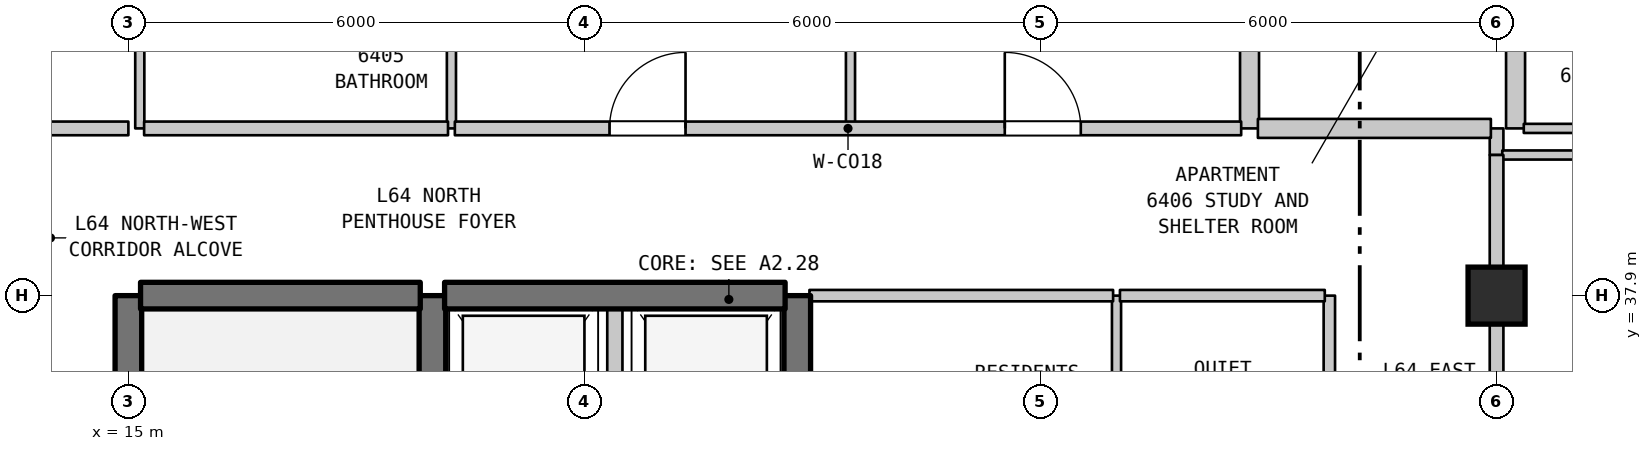
"""IFC4 building model, lengths in metres.
Left out: names, types, materials, properties, quantities, classifications, styles, units other than length and angle.
Written with IfcOpenShell. Run it as: python <this file> out.ifc"""

import sys

from ifc_helpers import new_model, si_unit, direction, frame, frame_2d, origin, origin_2d, place, context, subcontext, project, spatial, rectangle, extrude, element, fill, save


model = new_model("IFC4")
c1 = context("Model", 3, precision=1e-05, world=origin(), true_north=direction((0.0, 1.0)))
c2 = subcontext(c1, "Body", "Model", "MODEL_VIEW")
j1 = project(units=[si_unit("LENGTHUNIT", "METRE"), si_unit("PLANEANGLEUNIT", "RADIAN")], contexts=[c1])
p1 = place(None, origin())
s1 = spatial("IfcSite", under=j1, at=p1, CompositionType="ELEMENT")
p2 = place(p1, origin())
s2 = spatial("IfcBuilding", under=s1, at=p2, CompositionType="ELEMENT")
p3 = place(p2, frame((0.0, 0.0, 258.4)))
s3 = spatial("IfcBuildingStorey", under=s2, at=p3, CompositionType="ELEMENT", Elevation=258.4)
p4 = place(p3, frame((33.0, 37.9, 0.0), z_axis=(0.0, 0.0, 1.0), x_axis=(1.0, 0.0, 0.0)))
e1 = element("IfcColumn", 1, at=p4, inside=s3, PredefinedType="COLUMN", context=c2, shape_type="SweptSolid", body=[
    extrude(rectangle(XDim=0.75, YDim=0.75, at=origin_2d()), origin(), (0.0, 0.0, 1.0), 3.7),
])
p5 = place(p3, frame((15.0, 31.1, 0.0), z_axis=(0.0, 0.0, 1.0), x_axis=(0.0, 1.0, 0.0)))
e2 = element("IfcWall", 2, at=p5, inside=s3, PredefinedType="SHEAR", context=c2, shape_type="SweptSolid", body=[
    extrude(rectangle(XDim=6.8, YDim=0.35, at=frame_2d((3.4, 0.0))), origin(), (0.0, 0.0, 1.0), 3.39),
])
p6 = place(p3, frame((15.15, 40.1, 0.0), z_axis=(0.0, 0.0, 1.0), x_axis=(0.0, 1.0, 0.0)))
e3 = element("IfcWall", 3, at=p6, inside=s3, PredefinedType="PARTITIONING", context=c2, shape_type="SweptSolid", body=[
    extrude(rectangle(XDim=2.3, YDim=0.12, at=frame_2d((1.15, 0.0))), origin(), (0.0, 0.0, 1.0), 3.39),
])
p7 = place(p3, frame((19.0, 35.0, 0.0), z_axis=(0.0, 0.0, 1.0), x_axis=(0.0, 1.0, 0.0)))
e4 = element("IfcWall", 4, at=p7, inside=s3, PredefinedType="SHEAR", context=c2, shape_type="SweptSolid", body=[
    extrude(rectangle(XDim=2.9, YDim=0.35, at=frame_2d((1.45, 0.0))), origin(), (0.0, 0.0, 1.0), 3.39),
])
p8 = place(p3, frame((19.25, 40.1, 0.0), z_axis=(0.0, 0.0, 1.0), x_axis=(0.0, 1.0, 0.0)))
e5 = element("IfcWall", 5, at=p8, inside=s3, PredefinedType="PARTITIONING", context=c2, shape_type="SweptSolid", body=[
    extrude(rectangle(XDim=2.3, YDim=0.12, at=frame_2d((1.15, 0.0))), origin(), (0.0, 0.0, 1.0), 3.39),
])
p9 = place(p3, frame((21.4, 35.0, 0.0), z_axis=(0.0, 0.0, 1.0), x_axis=(0.0, 1.0, 0.0)))
e6 = element("IfcWall", 6, at=p9, inside=s3, PredefinedType="STANDARD", context=c2, shape_type="SweptSolid", body=[
    extrude(rectangle(XDim=2.9, YDim=0.2, at=frame_2d((1.45, 0.0))), origin(), (0.0, 0.0, 1.0), 3.39),
])
p10 = place(p3, frame((23.8, 35.0, 0.0), z_axis=(0.0, 0.0, 1.0), x_axis=(0.0, 1.0, 0.0)))
e7 = element("IfcWall", 7, at=p10, inside=s3, PredefinedType="SHEAR", context=c2, shape_type="SweptSolid", body=[
    extrude(rectangle(XDim=2.9, YDim=0.35, at=frame_2d((1.45, 0.0))), origin(), (0.0, 0.0, 1.0), 3.39),
])
p11 = place(p3, frame((24.5, 40.1, 0.0), z_axis=(0.0, 0.0, 1.0), x_axis=(0.0, 1.0, 0.0)))
e8 = element("IfcWall", 8, at=p11, inside=s3, PredefinedType="PARTITIONING", context=c2, shape_type="SweptSolid", body=[
    extrude(rectangle(XDim=2.05, YDim=0.12, at=frame_2d((1.025, 0.0))), origin(), (0.0, 0.0, 1.0), 3.39),
])
p12 = place(p3, frame((28.0, 35.0, 0.0), z_axis=(0.0, 0.0, 1.0), x_axis=(0.0, 1.0, 0.0)))
e9 = element("IfcWall", 9, at=p12, inside=s3, PredefinedType="PARTITIONING", context=c2, shape_type="SweptSolid", body=[
    extrude(rectangle(XDim=2.9, YDim=0.12, at=frame_2d((1.45, 0.0))), origin(), (0.0, 0.0, 1.0), 3.39),
])
p13 = place(p3, frame((29.75, 40.1, 0.0), z_axis=(0.0, 0.0, 1.0), x_axis=(0.0, 1.0, 0.0)))
e10 = element("IfcWall", 10, at=p13, inside=s3, PredefinedType="STANDARD", context=c2, shape_type="SweptSolid", body=[
    extrude(rectangle(XDim=2.3, YDim=0.25, at=frame_2d((1.15, 0.0))), origin(), (0.0, 0.0, 1.0), 3.39),
])
p14 = place(p3, frame((30.8, 35.0, 0.0), z_axis=(0.0, 0.0, 1.0), x_axis=(0.0, 1.0, 0.0)))
e11 = element("IfcWall", 11, at=p14, inside=s3, PredefinedType="STANDARD", context=c2, shape_type="SweptSolid", body=[
    extrude(rectangle(XDim=2.9, YDim=0.15, at=frame_2d((1.45, 0.0))), origin(), (0.0, 0.0, 1.0), 3.39),
])
p15 = place(p3, frame((33.0, 36.366, 0.0), z_axis=(0.0, 0.0, 1.0), x_axis=(0.0, 1.0, 0.0)))
e12 = element("IfcWall", 12, at=p15, inside=s3, PredefinedType="STANDARD", context=c2, shape_type="SweptSolid", body=[
    extrude(rectangle(XDim=1.534, YDim=0.18, at=frame_2d((0.767, 0.0))), origin(), (0.0, 0.0, 1.0), 2.89),
])
p16 = place(p3, frame((33.0, 39.75, 0.0), z_axis=(0.0, 0.0, 1.0), x_axis=(0.0, 1.0, 0.0)))
e13 = element("IfcWall", 13, at=p16, inside=s3, PredefinedType="STANDARD", context=c2, shape_type="SweptSolid", body=[
    extrude(rectangle(XDim=0.35, YDim=0.18, at=frame_2d((0.175, 0.0))), origin(), (0.0, 0.0, 1.0), 3.39),
])
p17 = place(p3, frame((33.25, 40.1, 0.0), z_axis=(0.0, 0.0, 1.0), x_axis=(0.0, 1.0, 0.0)))
e14 = element("IfcWall", 14, at=p17, inside=s3, PredefinedType="STANDARD", context=c2, shape_type="SweptSolid", body=[
    extrude(rectangle(XDim=2.3, YDim=0.25, at=frame_2d((1.15, 0.0))), origin(), (0.0, 0.0, 1.0), 3.39),
])
p18 = place(p3, frame((15.16, 37.9, 0.0), z_axis=(0.0, 0.0, 1.0), x_axis=(1.0, 0.0, 0.0)))
e15 = element("IfcWall", 15, at=p18, inside=s3, PredefinedType="SHEAR", context=c2, shape_type="SweptSolid", body=[
    extrude(rectangle(XDim=3.68, YDim=0.35, at=frame_2d((1.84, 0.0))), origin(), (0.0, 0.0, 1.0), 3.39),
])
p19 = place(p3, frame((19.16, 37.9, 0.0), z_axis=(0.0, 0.0, 1.0), x_axis=(1.0, 0.0, 0.0)))
e16 = element("IfcWall", 16, at=p19, inside=s3, PredefinedType="SHEAR", context=c2, shape_type="SweptSolid", body=[
    extrude(rectangle(XDim=4.48, YDim=0.35, at=frame_2d((2.24, 0.0))), origin(), (0.0, 0.0, 1.0), 3.39),
])
p20 = place(p3, frame((23.96, 37.9, 0.0), z_axis=(0.0, 0.0, 1.0), x_axis=(1.0, 0.0, 0.0)))
e17 = element("IfcWall", 17, at=p20, inside=s3, PredefinedType="STANDARD", context=c2, shape_type="SweptSolid", body=[
    extrude(rectangle(XDim=3.995, YDim=0.15, at=frame_2d((1.998, 0.0))), origin(), (0.0, 0.0, 1.0), 2.89),
])
p21 = place(p3, frame((28.045, 37.9, 0.0), z_axis=(0.0, 0.0, 1.0), x_axis=(1.0, 0.0, 0.0)))
e18 = element("IfcWall", 18, at=p21, inside=s3, PredefinedType="STANDARD", context=c2, shape_type="SweptSolid", body=[
    extrude(rectangle(XDim=2.695, YDim=0.15, at=frame_2d((1.348, 0.0))), origin(), (0.0, 0.0, 1.0), 2.89),
])
p22 = place(p3, frame((33.075, 39.75, 0.0), z_axis=(0.0, 0.0, 1.0), x_axis=(1.0, 0.0, 0.0)))
e19 = element("IfcWall", 19, at=p22, inside=s3, PredefinedType="PARTITIONING", context=c2, shape_type="SweptSolid", body=[
    extrude(rectangle(XDim=4.46, YDim=0.12, at=frame_2d((2.23, 0.0))), origin(), (0.0, 0.0, 1.0), 3.39),
])
p23 = place(p3, frame((12.975, 40.1, 0.0), z_axis=(0.0, 0.0, 1.0), x_axis=(1.0, 0.0, 0.0)))
e20 = element("IfcWall", 20, at=p23, inside=s3, PredefinedType="STANDARD", context=c2, shape_type="SweptSolid", body=[
    extrude(rectangle(XDim=2.025, YDim=0.18, at=frame_2d((1.012, 0.0))), origin(), (0.0, 0.0, 1.0), 3.39),
])
p24 = place(p3, frame((15.207, 40.1, 0.0), z_axis=(0.0, 0.0, 1.0), x_axis=(1.0, 0.0, 0.0)))
e21 = element("IfcWall", 21, at=p24, inside=s3, PredefinedType="STANDARD", context=c2, shape_type="SweptSolid", body=[
    extrude(rectangle(XDim=3.998, YDim=0.18, at=frame_2d((1.999, 0.0))), origin(), (0.0, 0.0, 1.0), 3.39),
])
p25 = place(p3, frame((19.295, 40.1, 0.0), z_axis=(0.0, 0.0, 1.0), x_axis=(1.0, 0.0, 0.0)))
e22 = element("IfcWall", 22, at=p25, inside=s3, PredefinedType="STANDARD", context=c2, shape_type="SweptSolid", body=[
    extrude(rectangle(XDim=10.345, YDim=0.18, at=frame_2d((5.172, 0.0))), origin(), (0.0, 0.0, 1.0), 3.39),
])
p26 = place(p25, frame((2.035, 0.0, 0.0)))
e23 = element("IfcOpeningElement", 23, at=p26, cuts=e22, PredefinedType="OPENING", context=c2, shape_type="SweptSolid", body=[
    extrude(rectangle(XDim=1.0, YDim=2.15, at=frame_2d((0.5, 1.075))), frame((0.0, 0.1, 0.0), z_axis=(0.0, -1.0, 0.0), x_axis=(1.0, 0.0, 0.0)), (0.0, 0.0, 1.0), 0.2),
])
p27 = place(p25, frame((7.235, 0.0, 0.0)))
e24 = element("IfcOpeningElement", 24, at=p27, cuts=e22, PredefinedType="OPENING", context=c2, shape_type="SweptSolid", body=[
    extrude(rectangle(XDim=1.0, YDim=2.15, at=frame_2d((0.5, 1.075))), frame((0.0, 0.1, 0.0), z_axis=(0.0, -1.0, 0.0), x_axis=(1.0, 0.0, 0.0)), (0.0, 0.0, 1.0), 0.2),
])
p28 = place(p3, frame((29.86, 40.1, 0.0), z_axis=(0.0, 0.0, 1.0), x_axis=(1.0, 0.0, 0.0)))
e25 = element("IfcWall", 25, at=p28, inside=s3, PredefinedType="STANDARD", context=c2, shape_type="SweptSolid", body=[
    extrude(rectangle(XDim=3.065, YDim=0.25, at=frame_2d((1.532, 0.0))), origin(), (0.0, 0.0, 1.0), 3.39),
])
p29 = place(p3, frame((33.358, 40.1, 0.0), z_axis=(0.0, 0.0, 1.0), x_axis=(1.0, 0.0, 0.0)))
e26 = element("IfcWall", 26, at=p29, inside=s3, PredefinedType="PARTITIONING", context=c2, shape_type="SweptSolid", body=[
    extrude(rectangle(XDim=2.925, YDim=0.12, at=frame_2d((1.462, 0.0))), origin(), (0.0, 0.0, 1.0), 3.39),
])
p30 = place(p3, frame((33.0, 37.9, 0.0), z_axis=(0.0, 0.0, 1.0), x_axis=(0.0, 1.0, 0.0)))
e27 = element("IfcWall", 27, at=p30, inside=s3, PredefinedType="STANDARD", context=c2, shape_type="SweptSolid", body=[
    extrude(rectangle(XDim=1.85, YDim=0.18, at=frame_2d((0.925, 0.0))), origin(), (0.0, 0.0, 1.0), 2.79),
])
p31 = place(p26, origin())
e28 = element("IfcDoor", 28, at=p31, inside=s3, OperationType="SINGLE_SWING_RIGHT", PredefinedType="DOOR", context=c2, shape_type="SweptSolid", body=[
    extrude(rectangle(XDim=1.0, YDim=2.15, at=frame_2d((0.5, 1.075))), frame((0.0, 0.025, 0.0), z_axis=(0.0, -1.0, 0.0), x_axis=(1.0, 0.0, 0.0)), (0.0, 0.0, 1.0), 0.05),
])
fill(e23, e28)
p32 = place(p27, origin())
e29 = element("IfcDoor", 29, at=p32, inside=s3, OperationType="SINGLE_SWING_LEFT", PredefinedType="DOOR", context=c2, shape_type="SweptSolid", body=[
    extrude(rectangle(XDim=1.0, YDim=2.15, at=frame_2d((0.5, 1.075))), frame((0.0, 0.025, 0.0), z_axis=(0.0, -1.0, 0.0), x_axis=(1.0, 0.0, 0.0)), (0.0, 0.0, 1.0), 0.05),
])
fill(e24, e29)
save(model, sys.argv[1])
